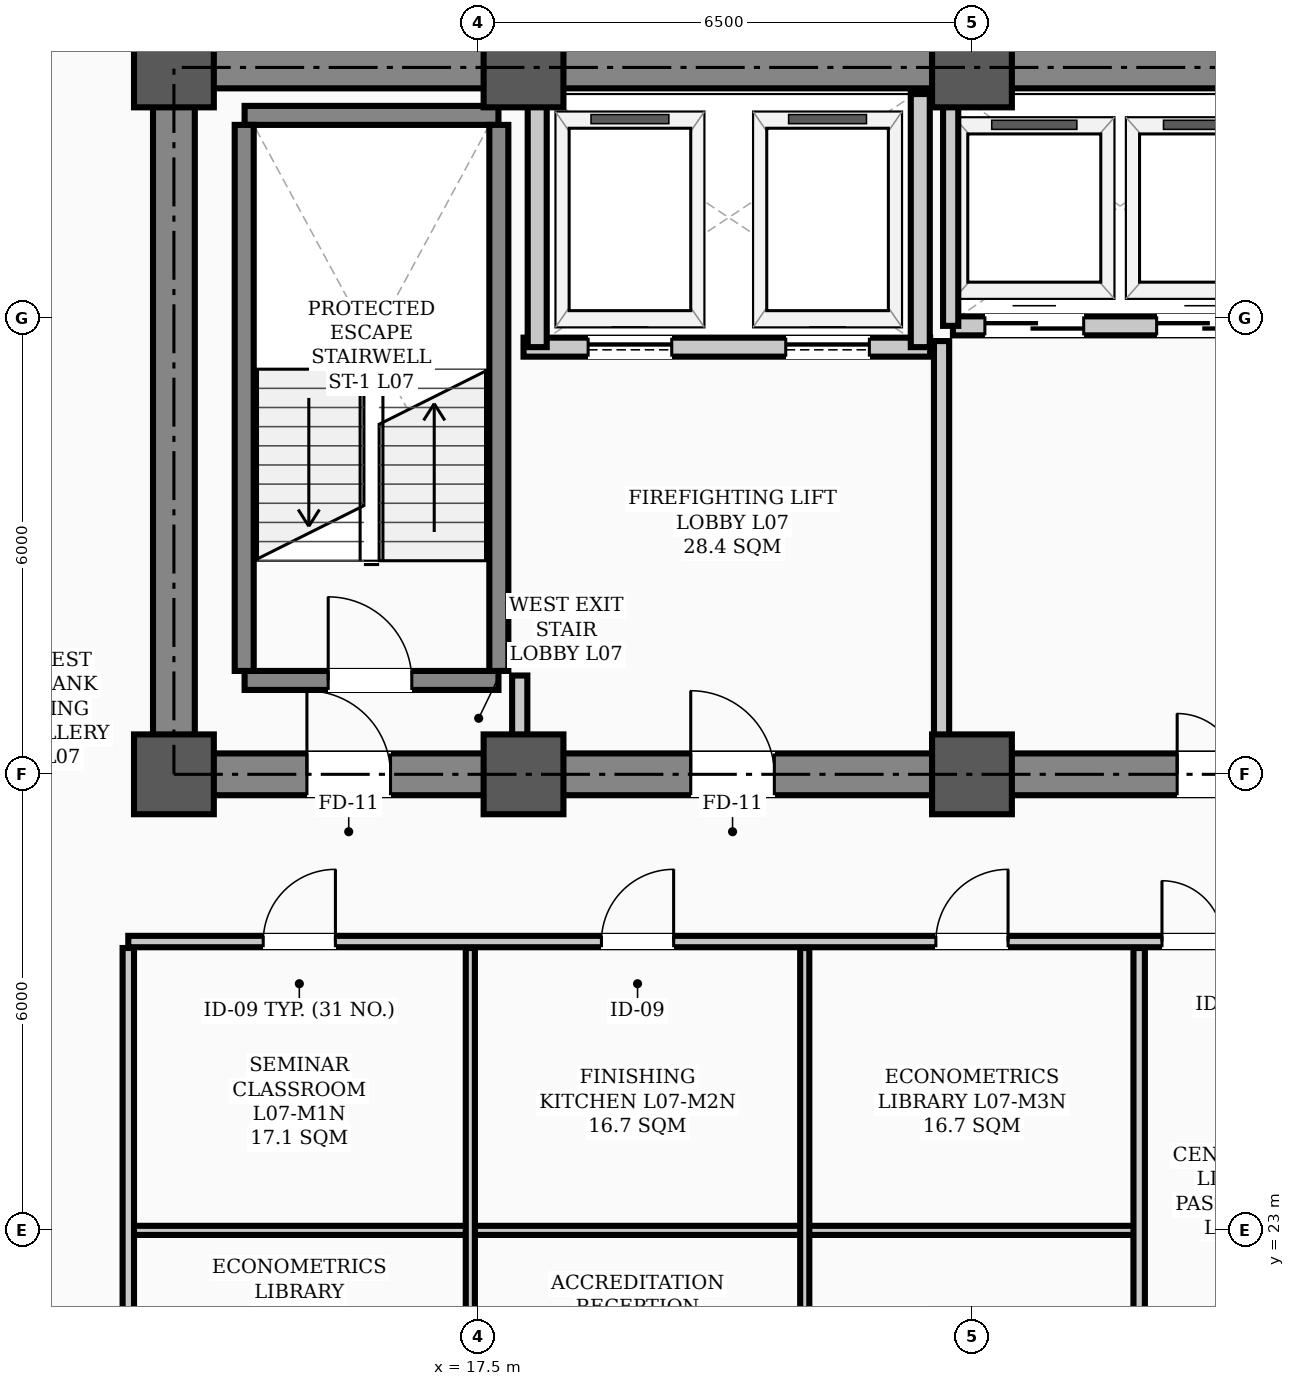
"""IFC4 building model, lengths in metres.
Left out: names, types, materials, properties, quantities, classifications, styles, units other than length and angle.
Written with IfcOpenShell. Run it as: python <this file> out.ifc"""

import sys

from ifc_helpers import new_model, si_unit, direction, frame, frame_2d, origin, origin_2d, place, context, subcontext, project, spatial, rectangle, hollow_rectangle, extrude, element, fill, save


model = new_model("IFC4")
c1 = context("Model", 3, precision=1e-05, world=origin(), true_north=direction((0.0, 1.0)))
c2 = subcontext(c1, "Body", "Model", "MODEL_VIEW")
j1 = project(units=[si_unit("LENGTHUNIT", "METRE"), si_unit("PLANEANGLEUNIT", "RADIAN")], contexts=[c1])
p1 = place(None, origin())
s1 = spatial("IfcSite", under=j1, at=p1, CompositionType="ELEMENT")
p2 = place(p1, origin())
s2 = spatial("IfcBuilding", under=s1, at=p2, CompositionType="ELEMENT")
p3 = place(p2, frame((0.0, 0.0, 30.4)))
s3 = spatial("IfcBuildingStorey", under=s2, at=p3, CompositionType="ELEMENT", Elevation=30.4)
for number, where, z_axis, x_axis in (
    (1, (13.5, 29.0, 0.0), (0.0, 0.0, 1.0), (1.0, 0.0, 0.0)),
    (2, (13.5, 38.3, 0.0), (0.0, 0.0, 1.0), (1.0, 0.0, 0.0)),
    (3, (18.1, 29.0, 0.0), (0.0, 0.0, 1.0), (1.0, 0.0, 0.0)),
    (4, (18.1, 38.3, 0.0), (0.0, 0.0, 1.0), (1.0, 0.0, 0.0)),
    (5, (24.0, 29.0, 0.0), (0.0, 0.0, 1.0), (1.0, 0.0, 0.0)),
    (6, (24.0, 38.3, 0.0), (0.0, 0.0, 1.0), (1.0, 0.0, 0.0)),
):
    element("IfcColumn", number, at=place(p3, frame(where, z_axis=z_axis, x_axis=x_axis)), inside=s3, PredefinedType="COLUMN", context=c2, shape_type="SweptSolid", body=[
        extrude(hollow_rectangle(XDim=1.05, YDim=1.05, WallThickness=0.038, InnerFilletRadius=0.019, OuterFilletRadius=0.057, at=origin_2d()), origin(), (0.0, 0.0, 1.0), 3.9),
    ])
p4 = place(p3, frame((13.5, 29.0, 0.0), z_axis=(0.0, 0.0, 1.0), x_axis=(1.0, 0.0, 0.0)))
e7 = element("IfcWall", 7, at=p4, inside=s3, PredefinedType="SHEAR", context=c2, shape_type="SweptSolid", body=[
    extrude(rectangle(XDim=30.5, YDim=0.55, at=frame_2d((15.25, 0.0))), origin(), (0.0, 0.0, 1.0), 3.72),
])
p5 = place(p4, frame((1.75, 0.0, 0.0)))
e8 = element("IfcOpeningElement", 8, at=p5, cuts=e7, PredefinedType="OPENING", context=c2, shape_type="SweptSolid", body=[
    extrude(rectangle(XDim=1.1, YDim=2.08, at=frame_2d((0.55, 1.04))), frame((0.0, 0.285, 0.0), z_axis=(0.0, -1.0, 0.0), x_axis=(1.0, 0.0, 0.0)), (0.0, 0.0, 1.0), 0.57),
])
p6 = place(p4, frame((26.7, 0.0, 0.0)))
e9 = element("IfcOpeningElement", 9, at=p6, cuts=e7, PredefinedType="OPENING", context=c2, shape_type="SweptSolid", body=[
    extrude(rectangle(XDim=1.1, YDim=2.08, at=frame_2d((0.55, 1.04))), frame((0.0, 0.285, 0.0), z_axis=(0.0, -1.0, 0.0), x_axis=(1.0, 0.0, 0.0)), (0.0, 0.0, 1.0), 0.57),
])
p7 = place(p4, frame((6.8, 0.0, 0.0)))
e10 = element("IfcOpeningElement", 10, at=p7, cuts=e7, PredefinedType="OPENING", context=c2, shape_type="SweptSolid", body=[
    extrude(rectangle(XDim=1.1, YDim=2.08, at=frame_2d((0.55, 1.04))), frame((0.0, 0.285, 0.0), z_axis=(0.0, -1.0, 0.0), x_axis=(1.0, 0.0, 0.0)), (0.0, 0.0, 1.0), 0.57),
])
p8 = place(p4, frame((13.2, 0.0, 0.0)))
e11 = element("IfcOpeningElement", 11, at=p8, cuts=e7, PredefinedType="OPENING", context=c2, shape_type="SweptSolid", body=[
    extrude(rectangle(XDim=1.6, YDim=2.08, at=frame_2d((0.8, 1.04))), frame((0.0, 0.285, 0.0), z_axis=(0.0, -1.0, 0.0), x_axis=(1.0, 0.0, 0.0)), (0.0, 0.0, 1.0), 0.57),
])
p9 = place(p4, frame((19.6, 0.0, 0.0)))
e12 = element("IfcOpeningElement", 12, at=p9, cuts=e7, PredefinedType="OPENING", context=c2, shape_type="SweptSolid", body=[
    extrude(rectangle(XDim=0.9, YDim=2.08, at=frame_2d((0.45, 1.04))), frame((0.0, 0.285, 0.0), z_axis=(0.0, -1.0, 0.0), x_axis=(1.0, 0.0, 0.0)), (0.0, 0.0, 1.0), 0.57),
])
p10 = place(p4, frame((21.6, 0.0, 0.0)))
e13 = element("IfcOpeningElement", 13, at=p10, cuts=e7, PredefinedType="OPENING", context=c2, shape_type="SweptSolid", body=[
    extrude(rectangle(XDim=0.9, YDim=2.08, at=frame_2d((0.45, 1.04))), frame((0.0, 0.285, 0.0), z_axis=(0.0, -1.0, 0.0), x_axis=(1.0, 0.0, 0.0)), (0.0, 0.0, 1.0), 0.57),
])
p11 = place(p3, frame((13.5, 38.3, 0.0), z_axis=(0.0, 0.0, 1.0), x_axis=(1.0, 0.0, 0.0)))
e14 = element("IfcWall", 14, at=p11, inside=s3, PredefinedType="SHEAR", context=c2, shape_type="SweptSolid", body=[
    extrude(rectangle(XDim=30.5, YDim=0.55, at=frame_2d((15.25, 0.0))), origin(), (0.0, 0.0, 1.0), 3.72),
])
p12 = place(p3, frame((13.5, 29.35, 0.0), z_axis=(0.0, 0.0, 1.0), x_axis=(0.0, 1.0, 0.0)))
e15 = element("IfcWall", 15, at=p12, inside=s3, PredefinedType="SHEAR", context=c2, shape_type="SweptSolid", body=[
    extrude(rectangle(XDim=8.6, YDim=0.55, at=frame_2d((4.3, 0.0))), origin(), (0.0, 0.0, 1.0), 3.72),
])
p13 = place(p3, frame((14.43, 30.235, 0.0), z_axis=(0.0, 0.0, 1.0), x_axis=(1.0, 0.0, 0.0)))
e16 = element("IfcWall", 16, at=p13, inside=s3, PredefinedType="STANDARD", context=c2, shape_type="SweptSolid", body=[
    extrude(rectangle(XDim=3.34, YDim=0.25, at=frame_2d((1.67, 0.0))), origin(), (0.0, 0.0, 1.0), 3.72),
])
p14 = place(p13, frame((1.1, 0.0, 0.0)))
e17 = element("IfcOpeningElement", 17, at=p14, cuts=e16, PredefinedType="OPENING", context=c2, shape_type="SweptSolid", body=[
    extrude(rectangle(XDim=1.1, YDim=2.08, at=frame_2d((0.55, 1.04))), frame((0.0, 0.135, 0.0), z_axis=(0.0, -1.0, 0.0), x_axis=(1.0, 0.0, 0.0)), (0.0, 0.0, 1.0), 0.27),
])
p15 = place(p3, frame((14.43, 37.669, 0.0), z_axis=(0.0, 0.0, 1.0), x_axis=(1.0, 0.0, 0.0)))
e18 = element("IfcWall", 18, at=p15, inside=s3, PredefinedType="STANDARD", context=c2, shape_type="SweptSolid", body=[
    extrude(rectangle(XDim=3.34, YDim=0.25, at=frame_2d((1.67, 0.0))), origin(), (0.0, 0.0, 1.0), 3.72),
])
for number, where, z_axis, x_axis in (
    (19, (14.425, 30.36, 0.0), (0.0, 0.0, 1.0), (0.0, 1.0, 0.0)),
    (20, (17.775, 30.36, 0.0), (0.0, 0.0, 1.0), (0.0, 1.0, 0.0)),
):
    element("IfcWall", number, at=place(p3, frame(where, z_axis=z_axis, x_axis=x_axis)), inside=s3, PredefinedType="STANDARD", context=c2, shape_type="SweptSolid", body=[
        extrude(rectangle(XDim=7.184, YDim=0.25, at=frame_2d((3.592, 0.0))), origin(), (0.0, 0.0, 1.0), 3.72),
    ])
p16 = place(p3, frame((18.1, 34.62, 0.0), z_axis=(0.0, 0.0, 1.0), x_axis=(1.0, 0.0, 0.0)))
e21 = element("IfcWall", 21, at=p16, inside=s3, PredefinedType="STANDARD", context=c2, shape_type="SweptSolid", body=[
    extrude(rectangle(XDim=5.35, YDim=0.25, at=frame_2d((2.675, 0.0))), origin(), (0.0, 0.0, 1.0), 3.72),
])
p17 = place(p16, frame((0.85, 0.0, 0.0)))
e22 = element("IfcOpeningElement", 22, at=p17, cuts=e21, PredefinedType="OPENING", context=c2, shape_type="SweptSolid", body=[
    extrude(rectangle(XDim=1.1, YDim=2.08, at=frame_2d((0.55, 1.04))), frame((0.0, 0.135, 0.0), z_axis=(0.0, -1.0, 0.0), x_axis=(1.0, 0.0, 0.0)), (0.0, 0.0, 1.0), 0.27),
])
p18 = place(p16, frame((3.45, 0.0, 0.0)))
e23 = element("IfcOpeningElement", 23, at=p18, cuts=e21, PredefinedType="OPENING", context=c2, shape_type="SweptSolid", body=[
    extrude(rectangle(XDim=1.1, YDim=2.08, at=frame_2d((0.55, 1.04))), frame((0.0, 0.135, 0.0), z_axis=(0.0, -1.0, 0.0), x_axis=(1.0, 0.0, 0.0)), (0.0, 0.0, 1.0), 0.27),
])
for number, where, z_axis, x_axis in (
    (24, (18.28, 34.62, 0.0), (0.0, 0.0, 1.0), (0.0, 1.0, 0.0)),
    (25, (23.32, 34.62, 0.0), (0.0, 0.0, 1.0), (0.0, 1.0, 0.0)),
):
    element("IfcWall", number, at=place(p3, frame(where, z_axis=z_axis, x_axis=x_axis)), inside=s3, PredefinedType="STANDARD", context=c2, shape_type="SweptSolid", body=[
        extrude(rectangle(XDim=3.33, YDim=0.25, at=frame_2d((1.665, 0.0))), origin(), (0.0, 0.0, 1.0), 3.3),
    ])
p19 = place(p3, frame((23.75, 34.9, 0.0), z_axis=(0.0, 0.0, 1.0), x_axis=(1.0, 0.0, 0.0)))
e26 = element("IfcWall", 26, at=p19, inside=s3, PredefinedType="STANDARD", context=c2, shape_type="SweptSolid", body=[
    extrude(rectangle(XDim=4.4, YDim=0.25, at=frame_2d((2.2, 0.0))), origin(), (0.0, 0.0, 1.0), 3.72),
])
p20 = place(p19, frame((0.42, 0.0, 0.0)))
e27 = element("IfcOpeningElement", 27, at=p20, cuts=e26, PredefinedType="OPENING", context=c2, shape_type="SweptSolid", body=[
    extrude(rectangle(XDim=1.3, YDim=2.08, at=frame_2d((0.65, 1.04))), frame((0.0, 0.135, 0.0), z_axis=(0.0, -1.0, 0.0), x_axis=(1.0, 0.0, 0.0)), (0.0, 0.0, 1.0), 0.27),
])
p21 = place(p19, frame((2.68, 0.0, 0.0)))
e28 = element("IfcOpeningElement", 28, at=p21, cuts=e26, PredefinedType="OPENING", context=c2, shape_type="SweptSolid", body=[
    extrude(rectangle(XDim=1.3, YDim=2.08, at=frame_2d((0.65, 1.04))), frame((0.0, 0.135, 0.0), z_axis=(0.0, -1.0, 0.0), x_axis=(1.0, 0.0, 0.0)), (0.0, 0.0, 1.0), 0.27),
])
p22 = place(p3, frame((12.9, 26.8, 0.0), z_axis=(0.0, 0.0, 1.0), x_axis=(1.0, 0.0, 0.0)))
e29 = element("IfcWall", 29, at=p22, inside=s3, PredefinedType="PARTITIONING", context=c2, shape_type="SweptSolid", body=[
    extrude(rectangle(XDim=31.7, YDim=0.15, at=frame_2d((15.85, 0.0))), origin(), (0.0, 0.0, 1.0), 3.1),
])
p23 = place(p22, frame((13.6, 0.0, 0.0)))
e30 = element("IfcOpeningElement", 30, at=p23, cuts=e29, PredefinedType="OPENING", context=c2, shape_type="SweptSolid", body=[
    extrude(rectangle(XDim=1.6, YDim=2.08, at=frame_2d((0.8, 1.04))), frame((0.0, 0.085, 0.0), z_axis=(0.0, -1.0, 0.0), x_axis=(1.0, 0.0, 0.0)), (0.0, 0.0, 1.0), 0.17),
])
p24 = place(p22, frame((1.775, 0.0, 0.0)))
e31 = element("IfcOpeningElement", 31, at=p24, cuts=e29, PredefinedType="OPENING", context=c2, shape_type="SweptSolid", body=[
    extrude(rectangle(XDim=0.95, YDim=2.08, at=frame_2d((0.475, 1.04))), frame((0.0, 0.085, 0.0), z_axis=(0.0, -1.0, 0.0), x_axis=(1.0, 0.0, 0.0)), (0.0, 0.0, 1.0), 0.17),
])
p25 = place(p22, frame((6.225, 0.0, 0.0)))
e32 = element("IfcOpeningElement", 32, at=p25, cuts=e29, PredefinedType="OPENING", context=c2, shape_type="SweptSolid", body=[
    extrude(rectangle(XDim=0.95, YDim=2.08, at=frame_2d((0.475, 1.04))), frame((0.0, 0.085, 0.0), z_axis=(0.0, -1.0, 0.0), x_axis=(1.0, 0.0, 0.0)), (0.0, 0.0, 1.0), 0.17),
])
p26 = place(p22, frame((10.625, 0.0, 0.0)))
e33 = element("IfcOpeningElement", 33, at=p26, cuts=e29, PredefinedType="OPENING", context=c2, shape_type="SweptSolid", body=[
    extrude(rectangle(XDim=0.95, YDim=2.08, at=frame_2d((0.475, 1.04))), frame((0.0, 0.085, 0.0), z_axis=(0.0, -1.0, 0.0), x_axis=(1.0, 0.0, 0.0)), (0.0, 0.0, 1.0), 0.17),
])
p27 = place(p22, frame((16.075, 0.0, 0.0)))
e34 = element("IfcOpeningElement", 34, at=p27, cuts=e29, PredefinedType="OPENING", context=c2, shape_type="SweptSolid", body=[
    extrude(rectangle(XDim=0.95, YDim=2.08, at=frame_2d((0.475, 1.04))), frame((0.0, 0.085, 0.0), z_axis=(0.0, -1.0, 0.0), x_axis=(1.0, 0.0, 0.0)), (0.0, 0.0, 1.0), 0.17),
])
p28 = place(p22, frame((21.925, 0.0, 0.0)))
e35 = element("IfcOpeningElement", 35, at=p28, cuts=e29, PredefinedType="OPENING", context=c2, shape_type="SweptSolid", body=[
    extrude(rectangle(XDim=0.95, YDim=2.08, at=frame_2d((0.475, 1.04))), frame((0.0, 0.085, 0.0), z_axis=(0.0, -1.0, 0.0), x_axis=(1.0, 0.0, 0.0)), (0.0, 0.0, 1.0), 0.17),
])
p29 = place(p22, frame((28.625, 0.0, 0.0)))
e36 = element("IfcOpeningElement", 36, at=p29, cuts=e29, PredefinedType="OPENING", context=c2, shape_type="SweptSolid", body=[
    extrude(rectangle(XDim=0.95, YDim=2.08, at=frame_2d((0.475, 1.04))), frame((0.0, 0.085, 0.0), z_axis=(0.0, -1.0, 0.0), x_axis=(1.0, 0.0, 0.0)), (0.0, 0.0, 1.0), 0.17),
])
p30 = place(p3, frame((12.9, 23.0, 0.0), z_axis=(0.0, 0.0, 1.0), x_axis=(1.0, 0.0, 0.0)))
e37 = element("IfcWall", 37, at=p30, inside=s3, PredefinedType="PARTITIONING", context=c2, shape_type="SweptSolid", body=[
    extrude(rectangle(XDim=4.5, YDim=0.12, at=frame_2d((2.25, 0.0))), origin(), (0.0, 0.0, 1.0), 3.1),
])
p31 = place(p3, frame((17.4, 23.0, 0.0), z_axis=(0.0, 0.0, 1.0), x_axis=(1.0, 0.0, 0.0)))
e38 = element("IfcWall", 38, at=p31, inside=s3, PredefinedType="PARTITIONING", context=c2, shape_type="SweptSolid", body=[
    extrude(rectangle(XDim=4.4, YDim=0.12, at=frame_2d((2.2, 0.0))), origin(), (0.0, 0.0, 1.0), 3.3),
])
p32 = place(p3, frame((21.8, 23.0, 0.0), z_axis=(0.0, 0.0, 1.0), x_axis=(1.0, 0.0, 0.0)))
e39 = element("IfcWall", 39, at=p32, inside=s3, PredefinedType="PARTITIONING", context=c2, shape_type="SweptSolid", body=[
    extrude(rectangle(XDim=4.4, YDim=0.12, at=frame_2d((2.2, 0.0))), origin(), (0.0, 0.0, 1.0), 3.1),
])
p33 = place(p3, frame((18.05, 29.285, 0.0), z_axis=(0.0, 0.0, 1.0), x_axis=(0.0, 1.0, 0.0)))
e40 = element("IfcWall", 40, at=p33, inside=s3, PredefinedType="STANDARD", context=c2, shape_type="SweptSolid", body=[
    extrude(rectangle(XDim=1.015, YDim=0.2, at=frame_2d((0.508, 0.0))), origin(), (0.0, 0.0, 1.0), 3.3),
])
p34 = place(p3, frame((23.6, 29.285, 0.0), z_axis=(0.0, 0.0, 1.0), x_axis=(0.0, 1.0, 0.0)))
e41 = element("IfcWall", 41, at=p34, inside=s3, PredefinedType="STANDARD", context=c2, shape_type="SweptSolid", body=[
    extrude(rectangle(XDim=5.415, YDim=0.2, at=frame_2d((2.708, 0.0))), origin(), (0.0, 0.0, 1.0), 3.1),
])
for number, where, z_axis, x_axis in (
    (42, (26.2, 19.335, 0.0), (0.0, 0.0, 1.0), (0.0, 1.0, 0.0)),
    (43, (12.9, 19.335, 0.0), (0.0, 0.0, 1.0), (0.0, 1.0, 0.0)),
):
    element("IfcWall", number, at=place(p3, frame(where, z_axis=z_axis, x_axis=x_axis)), inside=s3, PredefinedType="PARTITIONING", context=c2, shape_type="SweptSolid", body=[
        extrude(rectangle(XDim=7.38, YDim=0.15, at=frame_2d((3.69, 0.0))), origin(), (0.0, 0.0, 1.0), 3.0),
    ])
for number, where, z_axis, x_axis in (
    (44, (17.4, 19.335, 0.0), (0.0, 0.0, 1.0), (0.0, 1.0, 0.0)),
    (45, (21.8, 19.335, 0.0), (0.0, 0.0, 1.0), (0.0, 1.0, 0.0)),
):
    element("IfcWall", number, at=place(p3, frame(where, z_axis=z_axis, x_axis=x_axis)), inside=s3, PredefinedType="PARTITIONING", context=c2, shape_type="SweptSolid", body=[
        extrude(rectangle(XDim=7.38, YDim=0.12, at=frame_2d((3.69, 0.0))), origin(), (0.0, 0.0, 1.0), 3.0),
    ])
p35 = place(p3, frame((23.72, 34.9, 0.0), z_axis=(0.0, 0.0, 1.0), x_axis=(0.0, 1.0, 0.0)))
e46 = element("IfcWall", 46, at=p35, inside=s3, PredefinedType="STANDARD", context=c2, shape_type="SweptSolid", body=[
    extrude(rectangle(XDim=3.12, YDim=0.2, at=frame_2d((1.56, 0.0))), origin(), (0.0, 0.0, 1.0), 3.1),
])
p36 = place(p14, origin())
e47 = element("IfcDoor", 47, at=p36, inside=s3, OperationType="SINGLE_SWING_LEFT", PredefinedType="DOOR", context=c2, shape_type="SweptSolid", body=[
    extrude(rectangle(XDim=1.1, YDim=2.08, at=frame_2d((0.55, 1.04))), frame((0.0, 0.025, 0.0), z_axis=(0.0, -1.0, 0.0), x_axis=(1.0, 0.0, 0.0)), (0.0, 0.0, 1.0), 0.05),
])
fill(e17, e47)
p37 = place(p5, origin())
e48 = element("IfcDoor", 48, at=p37, inside=s3, OperationType="SINGLE_SWING_LEFT", PredefinedType="DOOR", context=c2, shape_type="SweptSolid", body=[
    extrude(rectangle(XDim=1.1, YDim=2.08, at=frame_2d((0.55, 1.04))), frame((0.0, 0.025, 0.0), z_axis=(0.0, -1.0, 0.0), x_axis=(1.0, 0.0, 0.0)), (0.0, 0.0, 1.0), 0.05),
])
fill(e8, e48)
p38 = place(p7, origin())
e49 = element("IfcDoor", 49, at=p38, inside=s3, OperationType="SINGLE_SWING_LEFT", PredefinedType="DOOR", context=c2, shape_type="SweptSolid", body=[
    extrude(rectangle(XDim=1.1, YDim=2.08, at=frame_2d((0.55, 1.04))), frame((0.0, 0.025, 0.0), z_axis=(0.0, -1.0, 0.0), x_axis=(1.0, 0.0, 0.0)), (0.0, 0.0, 1.0), 0.05),
])
fill(e10, e49)
p39 = place(p8, origin())
e50 = element("IfcDoor", 50, at=p39, inside=s3, OperationType="DOUBLE_DOOR_SINGLE_SWING", PredefinedType="DOOR", context=c2, shape_type="SweptSolid", body=[
    extrude(rectangle(XDim=1.6, YDim=2.08, at=frame_2d((0.8, 1.04))), frame((0.0, 0.025, 0.0), z_axis=(0.0, -1.0, 0.0), x_axis=(1.0, 0.0, 0.0)), (0.0, 0.0, 1.0), 0.05),
])
fill(e11, e50)
p40 = place(p23, origin())
e51 = element("IfcDoor", 51, at=p40, inside=s3, OperationType="DOUBLE_DOOR_SINGLE_SWING", PredefinedType="DOOR", context=c2, shape_type="SweptSolid", body=[
    extrude(rectangle(XDim=1.6, YDim=2.08, at=frame_2d((0.8, 1.04))), frame((0.0, 0.025, 0.0), z_axis=(0.0, -1.0, 0.0), x_axis=(1.0, 0.0, 0.0)), (0.0, 0.0, 1.0), 0.05),
])
fill(e30, e51)
p41 = place(p24, origin())
e52 = element("IfcDoor", 52, at=p41, inside=s3, OperationType="SINGLE_SWING_RIGHT", PredefinedType="DOOR", context=c2, shape_type="SweptSolid", body=[
    extrude(rectangle(XDim=0.95, YDim=2.08, at=frame_2d((0.475, 1.04))), frame((0.0, 0.025, 0.0), z_axis=(0.0, -1.0, 0.0), x_axis=(1.0, 0.0, 0.0)), (0.0, 0.0, 1.0), 0.05),
])
fill(e31, e52)
p42 = place(p25, origin())
e53 = element("IfcDoor", 53, at=p42, inside=s3, OperationType="SINGLE_SWING_RIGHT", PredefinedType="DOOR", context=c2, shape_type="SweptSolid", body=[
    extrude(rectangle(XDim=0.95, YDim=2.08, at=frame_2d((0.475, 1.04))), frame((0.0, 0.025, 0.0), z_axis=(0.0, -1.0, 0.0), x_axis=(1.0, 0.0, 0.0)), (0.0, 0.0, 1.0), 0.05),
])
fill(e32, e53)
p43 = place(p26, origin())
e54 = element("IfcDoor", 54, at=p43, inside=s3, OperationType="SINGLE_SWING_RIGHT", PredefinedType="DOOR", context=c2, shape_type="SweptSolid", body=[
    extrude(rectangle(XDim=0.95, YDim=2.08, at=frame_2d((0.475, 1.04))), frame((0.0, 0.025, 0.0), z_axis=(0.0, -1.0, 0.0), x_axis=(1.0, 0.0, 0.0)), (0.0, 0.0, 1.0), 0.05),
])
fill(e33, e54)
p44 = place(p17, origin())
e55 = element("IfcDoor", 55, at=p44, inside=s3, OperationType="SLIDING_TO_LEFT", PredefinedType="DOOR", context=c2, shape_type="SweptSolid", body=[
    extrude(rectangle(XDim=1.1, YDim=2.08, at=frame_2d((0.55, 1.04))), frame((0.0, 0.025, 0.0), z_axis=(0.0, -1.0, 0.0), x_axis=(1.0, 0.0, 0.0)), (0.0, 0.0, 1.0), 0.05),
])
fill(e22, e55)
p45 = place(p18, origin())
e56 = element("IfcDoor", 56, at=p45, inside=s3, OperationType="SLIDING_TO_LEFT", PredefinedType="DOOR", context=c2, shape_type="SweptSolid", body=[
    extrude(rectangle(XDim=1.1, YDim=2.08, at=frame_2d((0.55, 1.04))), frame((0.0, 0.025, 0.0), z_axis=(0.0, -1.0, 0.0), x_axis=(1.0, 0.0, 0.0)), (0.0, 0.0, 1.0), 0.05),
])
fill(e23, e56)
p46 = place(p20, origin())
e57 = element("IfcDoor", 57, at=p46, inside=s3, OperationType="DOUBLE_DOOR_SLIDING", PredefinedType="DOOR", context=c2, shape_type="SweptSolid", body=[
    extrude(rectangle(XDim=1.3, YDim=2.08, at=frame_2d((0.65, 1.04))), frame((0.0, 0.025, 0.0), z_axis=(0.0, -1.0, 0.0), x_axis=(1.0, 0.0, 0.0)), (0.0, 0.0, 1.0), 0.05),
])
fill(e27, e57)
p47 = place(p21, origin())
e58 = element("IfcDoor", 58, at=p47, inside=s3, OperationType="DOUBLE_DOOR_SLIDING", PredefinedType="DOOR", context=c2, shape_type="SweptSolid", body=[
    extrude(rectangle(XDim=1.3, YDim=2.08, at=frame_2d((0.65, 1.04))), frame((0.0, 0.025, 0.0), z_axis=(0.0, -1.0, 0.0), x_axis=(1.0, 0.0, 0.0)), (0.0, 0.0, 1.0), 0.05),
])
fill(e28, e58)
save(model, sys.argv[1])
